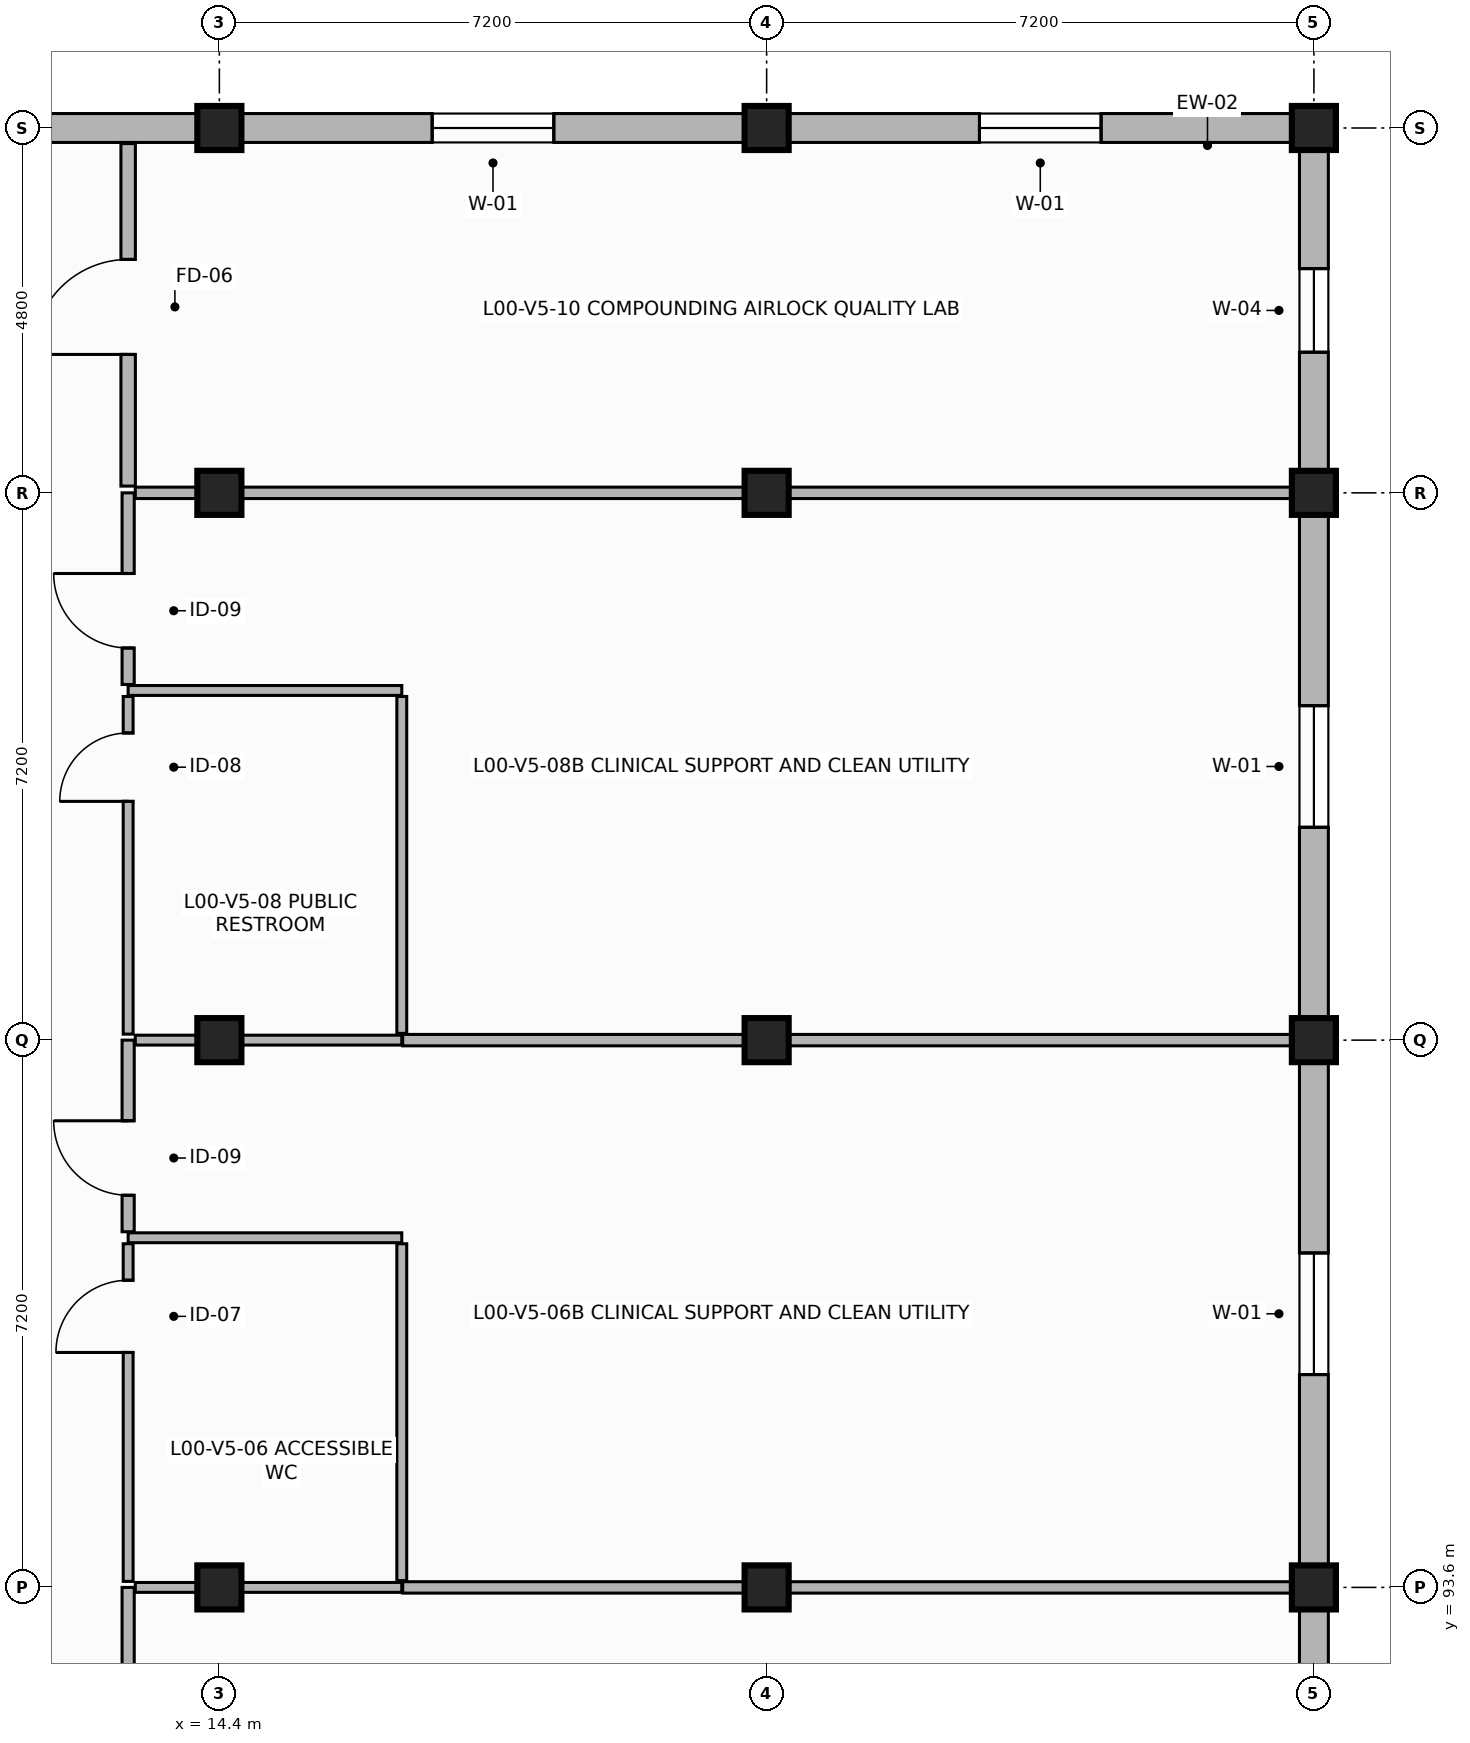
"""IFC4 building model, lengths in metres.
Left out: names, types, materials, properties, quantities, classifications, styles, units other than length and angle.
Written with IfcOpenShell. Run it as: python <this file> out.ifc"""

import sys

from ifc_helpers import new_model, si_unit, direction, frame, frame_2d, origin, origin_2d, place, context, subcontext, project, spatial, rectangle, extrude, element, fill, save


model = new_model("IFC4")
c1 = context("Model", 3, precision=1e-05, world=origin(), true_north=direction((0.0, 1.0)))
c2 = subcontext(c1, "Body", "Model", "MODEL_VIEW")
j1 = project(units=[si_unit("LENGTHUNIT", "METRE"), si_unit("PLANEANGLEUNIT", "RADIAN")], contexts=[c1])
p1 = place(None, origin())
s1 = spatial("IfcSite", under=j1, at=p1, CompositionType="ELEMENT")
p2 = place(p1, origin())
s2 = spatial("IfcBuilding", under=s1, at=p2, CompositionType="ELEMENT")
p3 = place(p2, origin())
s3 = spatial("IfcBuildingStorey", under=s2, at=p3, CompositionType="ELEMENT", Elevation=0.0)
for number, where, z_axis, x_axis in (
    (1, (14.4, 93.6, -0.38), (0.0, 0.0, 1.0), (1.0, 0.0, 0.0)),
    (2, (14.4, 100.8, -0.38), (0.0, 0.0, 1.0), (1.0, 0.0, 0.0)),
    (3, (14.4, 108.0, -0.38), (0.0, 0.0, 1.0), (1.0, 0.0, 0.0)),
    (4, (14.4, 112.8, -0.38), (0.0, 0.0, 1.0), (1.0, 0.0, 0.0)),
    (5, (21.6, 93.6, -0.38), (0.0, 0.0, 1.0), (1.0, 0.0, 0.0)),
    (6, (21.6, 100.8, -0.38), (0.0, 0.0, 1.0), (1.0, 0.0, 0.0)),
    (7, (21.6, 108.0, -0.38), (0.0, 0.0, 1.0), (1.0, 0.0, 0.0)),
    (8, (21.6, 112.8, -0.38), (0.0, 0.0, 1.0), (1.0, 0.0, 0.0)),
    (9, (28.8, 93.6, -0.38), (0.0, 0.0, 1.0), (1.0, 0.0, 0.0)),
    (10, (28.8, 100.8, -0.38), (0.0, 0.0, 1.0), (1.0, 0.0, 0.0)),
    (11, (28.8, 108.0, -0.38), (0.0, 0.0, 1.0), (1.0, 0.0, 0.0)),
    (12, (28.8, 112.8, -0.38), (0.0, 0.0, 1.0), (1.0, 0.0, 0.0)),
):
    element("IfcColumn", number, at=place(p3, frame(where, z_axis=z_axis, x_axis=x_axis)), inside=s3, PredefinedType="COLUMN", context=c2, shape_type="SweptSolid", body=[
        extrude(rectangle(XDim=0.58, YDim=0.58, at=origin_2d()), origin(), (0.0, 0.0, 1.0), 4.57),
    ])
p4 = place(p3, frame((28.8, 86.4, 0.0), z_axis=(0.0, 0.0, 1.0), x_axis=(0.0, 1.0, 0.0)))
e13 = element("IfcWall", 13, at=p4, inside=s3, PredefinedType="SOLIDWALL", context=c2, shape_type="SweptSolid", body=[
    extrude(rectangle(XDim=7.2, YDim=0.38, at=frame_2d((3.6, 0.0))), origin(), (0.0, 0.0, 1.0), 3.52),
])
p5 = place(p4, frame((2.8, 0.0, 0.85)))
e14 = element("IfcOpeningElement", 14, at=p5, cuts=e13, PredefinedType="OPENING", context=c2, shape_type="SweptSolid", body=[
    extrude(rectangle(XDim=1.6, YDim=2.45, at=frame_2d((0.8, 1.225))), frame((0.0, 0.2, 0.0), z_axis=(0.0, -1.0, 0.0), x_axis=(1.0, 0.0, 0.0)), (0.0, 0.0, 1.0), 0.4),
])
p6 = place(p3, frame((28.8, 93.6, 0.0), z_axis=(0.0, 0.0, 1.0), x_axis=(0.0, 1.0, 0.0)))
e15 = element("IfcWall", 15, at=p6, inside=s3, PredefinedType="SOLIDWALL", context=c2, shape_type="SweptSolid", body=[
    extrude(rectangle(XDim=7.2, YDim=0.38, at=frame_2d((3.6, 0.0))), origin(), (0.0, 0.0, 1.0), 3.52),
])
p7 = place(p6, frame((2.8, 0.0, 0.85)))
e16 = element("IfcOpeningElement", 16, at=p7, cuts=e15, PredefinedType="OPENING", context=c2, shape_type="SweptSolid", body=[
    extrude(rectangle(XDim=1.6, YDim=2.45, at=frame_2d((0.8, 1.225))), frame((0.0, 0.2, 0.0), z_axis=(0.0, -1.0, 0.0), x_axis=(1.0, 0.0, 0.0)), (0.0, 0.0, 1.0), 0.4),
])
p8 = place(p3, frame((28.8, 100.8, 0.0), z_axis=(0.0, 0.0, 1.0), x_axis=(0.0, 1.0, 0.0)))
e17 = element("IfcWall", 17, at=p8, inside=s3, PredefinedType="SOLIDWALL", context=c2, shape_type="SweptSolid", body=[
    extrude(rectangle(XDim=7.2, YDim=0.38, at=frame_2d((3.6, 0.0))), origin(), (0.0, 0.0, 1.0), 3.52),
])
p9 = place(p8, frame((2.8, 0.0, 0.85)))
e18 = element("IfcOpeningElement", 18, at=p9, cuts=e17, PredefinedType="OPENING", context=c2, shape_type="SweptSolid", body=[
    extrude(rectangle(XDim=1.6, YDim=2.45, at=frame_2d((0.8, 1.225))), frame((0.0, 0.2, 0.0), z_axis=(0.0, -1.0, 0.0), x_axis=(1.0, 0.0, 0.0)), (0.0, 0.0, 1.0), 0.4),
])
p10 = place(p3, frame((28.8, 108.0, 0.0), z_axis=(0.0, 0.0, 1.0), x_axis=(0.0, 1.0, 0.0)))
e19 = element("IfcWall", 19, at=p10, inside=s3, PredefinedType="SOLIDWALL", context=c2, shape_type="SweptSolid", body=[
    extrude(rectangle(XDim=4.8, YDim=0.38, at=frame_2d((2.4, 0.0))), origin(), (0.0, 0.0, 1.0), 3.52),
])
p11 = place(p10, frame((1.85, 0.0, 0.85)))
e20 = element("IfcOpeningElement", 20, at=p11, cuts=e19, PredefinedType="OPENING", context=c2, shape_type="SweptSolid", body=[
    extrude(rectangle(XDim=1.1, YDim=2.35, at=frame_2d((0.55, 1.175))), frame((0.0, 0.2, 0.0), z_axis=(0.0, -1.0, 0.0), x_axis=(1.0, 0.0, 0.0)), (0.0, 0.0, 1.0), 0.4),
])
p12 = place(p3, frame((28.8, 112.8, 0.0), z_axis=(0.0, 0.0, 1.0), x_axis=(-1.0, 0.0, 0.0)))
e21 = element("IfcWall", 21, at=p12, inside=s3, PredefinedType="SOLIDWALL", context=c2, shape_type="SweptSolid", body=[
    extrude(rectangle(XDim=7.2, YDim=0.38, at=frame_2d((3.6, 0.0))), origin(), (0.0, 0.0, 1.0), 3.52),
])
p13 = place(p12, frame((2.8, 0.0, 0.85)))
e22 = element("IfcOpeningElement", 22, at=p13, cuts=e21, PredefinedType="OPENING", context=c2, shape_type="SweptSolid", body=[
    extrude(rectangle(XDim=1.6, YDim=2.45, at=frame_2d((0.8, 1.225))), frame((0.0, 0.2, 0.0), z_axis=(0.0, -1.0, 0.0), x_axis=(1.0, 0.0, 0.0)), (0.0, 0.0, 1.0), 0.4),
])
p14 = place(p3, frame((21.6, 112.8, 0.0), z_axis=(0.0, 0.0, 1.0), x_axis=(-1.0, 0.0, 0.0)))
e23 = element("IfcWall", 23, at=p14, inside=s3, PredefinedType="SOLIDWALL", context=c2, shape_type="SweptSolid", body=[
    extrude(rectangle(XDim=7.2, YDim=0.38, at=frame_2d((3.6, 0.0))), origin(), (0.0, 0.0, 1.0), 3.52),
])
p15 = place(p14, frame((2.8, 0.0, 0.85)))
e24 = element("IfcOpeningElement", 24, at=p15, cuts=e23, PredefinedType="OPENING", context=c2, shape_type="SweptSolid", body=[
    extrude(rectangle(XDim=1.6, YDim=2.45, at=frame_2d((0.8, 1.225))), frame((0.0, 0.2, 0.0), z_axis=(0.0, -1.0, 0.0), x_axis=(1.0, 0.0, 0.0)), (0.0, 0.0, 1.0), 0.4),
])
p16 = place(p3, frame((14.4, 112.8, 0.0), z_axis=(0.0, 0.0, 1.0), x_axis=(-1.0, 0.0, 0.0)))
e25 = element("IfcWall", 25, at=p16, inside=s3, PredefinedType="SOLIDWALL", context=c2, shape_type="SweptSolid", body=[
    extrude(rectangle(XDim=7.2, YDim=0.38, at=frame_2d((3.6, 0.0))), origin(), (0.0, 0.0, 1.0), 3.52),
])
p17 = place(p16, frame((4.8, 0.0, 0.85)))
e26 = element("IfcOpeningElement", 26, at=p17, cuts=e25, PredefinedType="OPENING", context=c2, shape_type="SweptSolid", body=[
    extrude(rectangle(XDim=1.6, YDim=2.45, at=frame_2d((0.8, 1.225))), frame((0.0, 0.2, 0.0), z_axis=(0.0, -1.0, 0.0), x_axis=(1.0, 0.0, 0.0)), (0.0, 0.0, 1.0), 0.4),
])
p18 = place(p3, frame((13.2, 86.474, 0.0), z_axis=(0.0, 0.0, 1.0), x_axis=(0.0, 1.0, 0.0)))
e27 = element("IfcWall", 27, at=p18, inside=s3, PredefinedType="PARTITIONING", context=c2, shape_type="SweptSolid", body=[
    extrude(rectangle(XDim=7.126, YDim=0.16, at=frame_2d((3.563, 0.0))), origin(), (0.0, 0.0, 1.0), 3.5),
])
p19 = place(p18, frame((3.073, 0.0, 0.0)))
e28 = element("IfcOpeningElement", 28, at=p19, cuts=e27, PredefinedType="OPENING", context=c2, shape_type="SweptSolid", body=[
    extrude(rectangle(XDim=0.98, YDim=2.15, at=frame_2d((0.49, 1.075))), frame((0.0, 0.09, 0.0), z_axis=(0.0, -1.0, 0.0), x_axis=(1.0, 0.0, 0.0)), (0.0, 0.0, 1.0), 0.18),
])
p20 = place(p3, frame((13.294, 93.6, 0.0), z_axis=(0.0, 0.0, 1.0), x_axis=(1.0, 0.0, 0.0)))
e29 = element("IfcWall", 29, at=p20, inside=s3, PredefinedType="PARTITIONING", context=c2, shape_type="SweptSolid", body=[
    extrude(rectangle(XDim=3.506, YDim=0.13, at=frame_2d((1.753, 0.0))), origin(), (0.0, 0.0, 1.0), 3.5),
])
p21 = place(p3, frame((16.812, 93.6, 0.0), z_axis=(0.0, 0.0, 1.0), x_axis=(1.0, 0.0, 0.0)))
e30 = element("IfcWall", 30, at=p21, inside=s3, PredefinedType="PARTITIONING", context=c2, shape_type="SweptSolid", body=[
    extrude(rectangle(XDim=11.783, YDim=0.15, at=frame_2d((5.892, 0.0))), origin(), (0.0, 0.0, 1.0), 3.5),
])
p22 = place(p3, frame((13.2, 98.2, 0.0), z_axis=(0.0, 0.0, 1.0), x_axis=(1.0, 0.0, 0.0)))
e31 = element("IfcWall", 31, at=p22, inside=s3, PredefinedType="PARTITIONING", context=c2, shape_type="SweptSolid", body=[
    extrude(rectangle(XDim=3.6, YDim=0.13, at=frame_2d((1.8, 0.0))), origin(), (0.0, 0.0, 1.0), 3.5),
])
p23 = place(p3, frame((16.8, 98.121, 0.0), z_axis=(0.0, 0.0, 1.0), x_axis=(0.0, -1.0, 0.0)))
e32 = element("IfcWall", 32, at=p23, inside=s3, PredefinedType="PARTITIONING", context=c2, shape_type="SweptSolid", body=[
    extrude(rectangle(XDim=4.432, YDim=0.13, at=frame_2d((2.216, 0.0))), origin(), (0.0, 0.0, 1.0), 3.5),
])
p24 = place(p3, frame((13.2, 93.679, 0.0), z_axis=(0.0, 0.0, 1.0), x_axis=(0.0, 1.0, 0.0)))
e33 = element("IfcWall", 33, at=p24, inside=s3, PredefinedType="PARTITIONING", context=c2, shape_type="SweptSolid", body=[
    extrude(rectangle(XDim=4.442, YDim=0.13, at=frame_2d((2.221, 0.0))), origin(), (0.0, 0.0, 1.0), 3.5),
])
p25 = place(p24, frame((3.012, 0.0, 0.0)))
e34 = element("IfcOpeningElement", 34, at=p25, cuts=e33, PredefinedType="OPENING", context=c2, shape_type="SweptSolid", body=[
    extrude(rectangle(XDim=0.95, YDim=2.1, at=frame_2d((0.475, 1.05))), frame((0.0, 0.075, 0.0), z_axis=(0.0, -1.0, 0.0), x_axis=(1.0, 0.0, 0.0)), (0.0, 0.0, 1.0), 0.15),
])
p26 = place(p3, frame((13.2, 98.279, 0.0), z_axis=(0.0, 0.0, 1.0), x_axis=(0.0, 1.0, 0.0)))
e35 = element("IfcWall", 35, at=p26, inside=s3, PredefinedType="PARTITIONING", context=c2, shape_type="SweptSolid", body=[
    extrude(rectangle(XDim=2.521, YDim=0.16, at=frame_2d((1.26, 0.0))), origin(), (0.0, 0.0, 1.0), 3.5),
])
p27 = place(p26, frame((0.48, 0.0, 0.0)))
e36 = element("IfcOpeningElement", 36, at=p27, cuts=e35, PredefinedType="OPENING", context=c2, shape_type="SweptSolid", body=[
    extrude(rectangle(XDim=0.98, YDim=2.15, at=frame_2d((0.49, 1.075))), frame((0.0, 0.09, 0.0), z_axis=(0.0, -1.0, 0.0), x_axis=(1.0, 0.0, 0.0)), (0.0, 0.0, 1.0), 0.18),
])
p28 = place(p3, frame((13.294, 100.8, 0.0), z_axis=(0.0, 0.0, 1.0), x_axis=(1.0, 0.0, 0.0)))
e37 = element("IfcWall", 37, at=p28, inside=s3, PredefinedType="PARTITIONING", context=c2, shape_type="SweptSolid", body=[
    extrude(rectangle(XDim=3.506, YDim=0.13, at=frame_2d((1.753, 0.0))), origin(), (0.0, 0.0, 1.0), 3.5),
])
p29 = place(p3, frame((16.812, 100.8, 0.0), z_axis=(0.0, 0.0, 1.0), x_axis=(1.0, 0.0, 0.0)))
e38 = element("IfcWall", 38, at=p29, inside=s3, PredefinedType="PARTITIONING", context=c2, shape_type="SweptSolid", body=[
    extrude(rectangle(XDim=11.783, YDim=0.15, at=frame_2d((5.892, 0.0))), origin(), (0.0, 0.0, 1.0), 3.5),
])
p30 = place(p3, frame((13.2, 105.4, 0.0), z_axis=(0.0, 0.0, 1.0), x_axis=(1.0, 0.0, 0.0)))
e39 = element("IfcWall", 39, at=p30, inside=s3, PredefinedType="PARTITIONING", context=c2, shape_type="SweptSolid", body=[
    extrude(rectangle(XDim=3.6, YDim=0.13, at=frame_2d((1.8, 0.0))), origin(), (0.0, 0.0, 1.0), 3.5),
])
p31 = place(p3, frame((16.8, 105.321, 0.0), z_axis=(0.0, 0.0, 1.0), x_axis=(0.0, -1.0, 0.0)))
e40 = element("IfcWall", 40, at=p31, inside=s3, PredefinedType="PARTITIONING", context=c2, shape_type="SweptSolid", body=[
    extrude(rectangle(XDim=4.432, YDim=0.13, at=frame_2d((2.216, 0.0))), origin(), (0.0, 0.0, 1.0), 3.5),
])
p32 = place(p3, frame((13.2, 100.879, 0.0), z_axis=(0.0, 0.0, 1.0), x_axis=(0.0, 1.0, 0.0)))
e41 = element("IfcWall", 41, at=p32, inside=s3, PredefinedType="PARTITIONING", context=c2, shape_type="SweptSolid", body=[
    extrude(rectangle(XDim=4.442, YDim=0.13, at=frame_2d((2.221, 0.0))), origin(), (0.0, 0.0, 1.0), 3.5),
])
p33 = place(p32, frame((3.062, 0.0, 0.0)))
e42 = element("IfcOpeningElement", 42, at=p33, cuts=e41, PredefinedType="OPENING", context=c2, shape_type="SweptSolid", body=[
    extrude(rectangle(XDim=0.9, YDim=2.1, at=frame_2d((0.45, 1.05))), frame((0.0, 0.075, 0.0), z_axis=(0.0, -1.0, 0.0), x_axis=(1.0, 0.0, 0.0)), (0.0, 0.0, 1.0), 0.15),
])
p34 = place(p3, frame((13.2, 105.479, 0.0), z_axis=(0.0, 0.0, 1.0), x_axis=(0.0, 1.0, 0.0)))
e43 = element("IfcWall", 43, at=p34, inside=s3, PredefinedType="PARTITIONING", context=c2, shape_type="SweptSolid", body=[
    extrude(rectangle(XDim=2.521, YDim=0.16, at=frame_2d((1.26, 0.0))), origin(), (0.0, 0.0, 1.0), 3.5),
])
p35 = place(p34, frame((0.48, 0.0, 0.0)))
e44 = element("IfcOpeningElement", 44, at=p35, cuts=e43, PredefinedType="OPENING", context=c2, shape_type="SweptSolid", body=[
    extrude(rectangle(XDim=0.98, YDim=2.15, at=frame_2d((0.49, 1.075))), frame((0.0, 0.09, 0.0), z_axis=(0.0, -1.0, 0.0), x_axis=(1.0, 0.0, 0.0)), (0.0, 0.0, 1.0), 0.18),
])
p36 = place(p3, frame((13.294, 108.0, 0.0), z_axis=(0.0, 0.0, 1.0), x_axis=(1.0, 0.0, 0.0)))
e45 = element("IfcWall", 45, at=p36, inside=s3, PredefinedType="PARTITIONING", context=c2, shape_type="SweptSolid", body=[
    extrude(rectangle(XDim=15.301, YDim=0.15, at=frame_2d((7.65, 0.0))), origin(), (0.0, 0.0, 1.0), 3.5),
])
p37 = place(p3, frame((13.2, 108.089, 0.0), z_axis=(0.0, 0.0, 1.0), x_axis=(0.0, 1.0, 0.0)))
e46 = element("IfcWall", 46, at=p37, inside=s3, PredefinedType="PARTITIONING", context=c2, shape_type="SweptSolid", body=[
    extrude(rectangle(XDim=4.506, YDim=0.19, at=frame_2d((2.253, 0.0))), origin(), (0.0, 0.0, 1.0), 3.5),
])
p38 = place(p37, frame((1.732, 0.0, 0.0)))
e47 = element("IfcOpeningElement", 47, at=p38, cuts=e46, PredefinedType="OPENING", context=c2, shape_type="SweptSolid", body=[
    extrude(rectangle(XDim=1.25, YDim=2.2, at=frame_2d((0.625, 1.1))), frame((0.0, 0.105, 0.0), z_axis=(0.0, -1.0, 0.0), x_axis=(1.0, 0.0, 0.0)), (0.0, 0.0, 1.0), 0.21),
])
p39 = place(p7, origin())
e48 = element("IfcWindow", 48, at=p39, inside=s3, PartitioningType="SINGLE_PANEL", PredefinedType="WINDOW", context=c2, shape_type="SweptSolid", body=[
    extrude(rectangle(XDim=1.6, YDim=2.45, at=frame_2d((0.8, 1.225))), frame((0.0, 0.03, 0.0), z_axis=(0.0, -1.0, 0.0), x_axis=(1.0, 0.0, 0.0)), (0.0, 0.0, 1.0), 0.06),
])
fill(e16, e48)
p40 = place(p9, origin())
e49 = element("IfcWindow", 49, at=p40, inside=s3, PartitioningType="SINGLE_PANEL", PredefinedType="WINDOW", context=c2, shape_type="SweptSolid", body=[
    extrude(rectangle(XDim=1.6, YDim=2.45, at=frame_2d((0.8, 1.225))), frame((0.0, 0.03, 0.0), z_axis=(0.0, -1.0, 0.0), x_axis=(1.0, 0.0, 0.0)), (0.0, 0.0, 1.0), 0.06),
])
fill(e18, e49)
p41 = place(p11, origin())
e50 = element("IfcWindow", 50, at=p41, inside=s3, PartitioningType="SINGLE_PANEL", PredefinedType="WINDOW", context=c2, shape_type="SweptSolid", body=[
    extrude(rectangle(XDim=1.1, YDim=2.35, at=frame_2d((0.55, 1.175))), frame((0.0, 0.03, 0.0), z_axis=(0.0, -1.0, 0.0), x_axis=(1.0, 0.0, 0.0)), (0.0, 0.0, 1.0), 0.06),
])
fill(e20, e50)
p42 = place(p13, origin())
e51 = element("IfcWindow", 51, at=p42, inside=s3, PartitioningType="SINGLE_PANEL", PredefinedType="WINDOW", context=c2, shape_type="SweptSolid", body=[
    extrude(rectangle(XDim=1.6, YDim=2.45, at=frame_2d((0.8, 1.225))), frame((0.0, 0.03, 0.0), z_axis=(0.0, -1.0, 0.0), x_axis=(1.0, 0.0, 0.0)), (0.0, 0.0, 1.0), 0.06),
])
fill(e22, e51)
p43 = place(p15, origin())
e52 = element("IfcWindow", 52, at=p43, inside=s3, PartitioningType="SINGLE_PANEL", PredefinedType="WINDOW", context=c2, shape_type="SweptSolid", body=[
    extrude(rectangle(XDim=1.6, YDim=2.45, at=frame_2d((0.8, 1.225))), frame((0.0, 0.03, 0.0), z_axis=(0.0, -1.0, 0.0), x_axis=(1.0, 0.0, 0.0)), (0.0, 0.0, 1.0), 0.06),
])
fill(e24, e52)
p44 = place(p25, origin())
e53 = element("IfcDoor", 53, at=p44, inside=s3, OperationType="SINGLE_SWING_LEFT", PredefinedType="DOOR", context=c2, shape_type="SweptSolid", body=[
    extrude(rectangle(XDim=0.95, YDim=2.1, at=frame_2d((0.475, 1.05))), frame((0.0, 0.025, 0.0), z_axis=(0.0, -1.0, 0.0), x_axis=(1.0, 0.0, 0.0)), (0.0, 0.0, 1.0), 0.05),
])
fill(e34, e53)
p45 = place(p27, origin())
e54 = element("IfcDoor", 54, at=p45, inside=s3, OperationType="SINGLE_SWING_RIGHT", PredefinedType="DOOR", context=c2, shape_type="SweptSolid", body=[
    extrude(rectangle(XDim=0.98, YDim=2.15, at=frame_2d((0.49, 1.075))), frame((0.0, 0.025, 0.0), z_axis=(0.0, -1.0, 0.0), x_axis=(1.0, 0.0, 0.0)), (0.0, 0.0, 1.0), 0.05),
])
fill(e36, e54)
p46 = place(p33, origin())
e55 = element("IfcDoor", 55, at=p46, inside=s3, OperationType="SINGLE_SWING_LEFT", PredefinedType="DOOR", context=c2, shape_type="SweptSolid", body=[
    extrude(rectangle(XDim=0.9, YDim=2.1, at=frame_2d((0.45, 1.05))), frame((0.0, 0.025, 0.0), z_axis=(0.0, -1.0, 0.0), x_axis=(1.0, 0.0, 0.0)), (0.0, 0.0, 1.0), 0.05),
])
fill(e42, e55)
p47 = place(p35, origin())
e56 = element("IfcDoor", 56, at=p47, inside=s3, OperationType="SINGLE_SWING_RIGHT", PredefinedType="DOOR", context=c2, shape_type="SweptSolid", body=[
    extrude(rectangle(XDim=0.98, YDim=2.15, at=frame_2d((0.49, 1.075))), frame((0.0, 0.025, 0.0), z_axis=(0.0, -1.0, 0.0), x_axis=(1.0, 0.0, 0.0)), (0.0, 0.0, 1.0), 0.05),
])
fill(e44, e56)
p48 = place(p38, origin())
e57 = element("IfcDoor", 57, at=p48, inside=s3, OperationType="SINGLE_SWING_LEFT", PredefinedType="DOOR", context=c2, shape_type="SweptSolid", body=[
    extrude(rectangle(XDim=1.25, YDim=2.2, at=frame_2d((0.625, 1.1))), frame((0.0, 0.025, 0.0), z_axis=(0.0, -1.0, 0.0), x_axis=(1.0, 0.0, 0.0)), (0.0, 0.0, 1.0), 0.05),
])
fill(e47, e57)
save(model, sys.argv[1])
